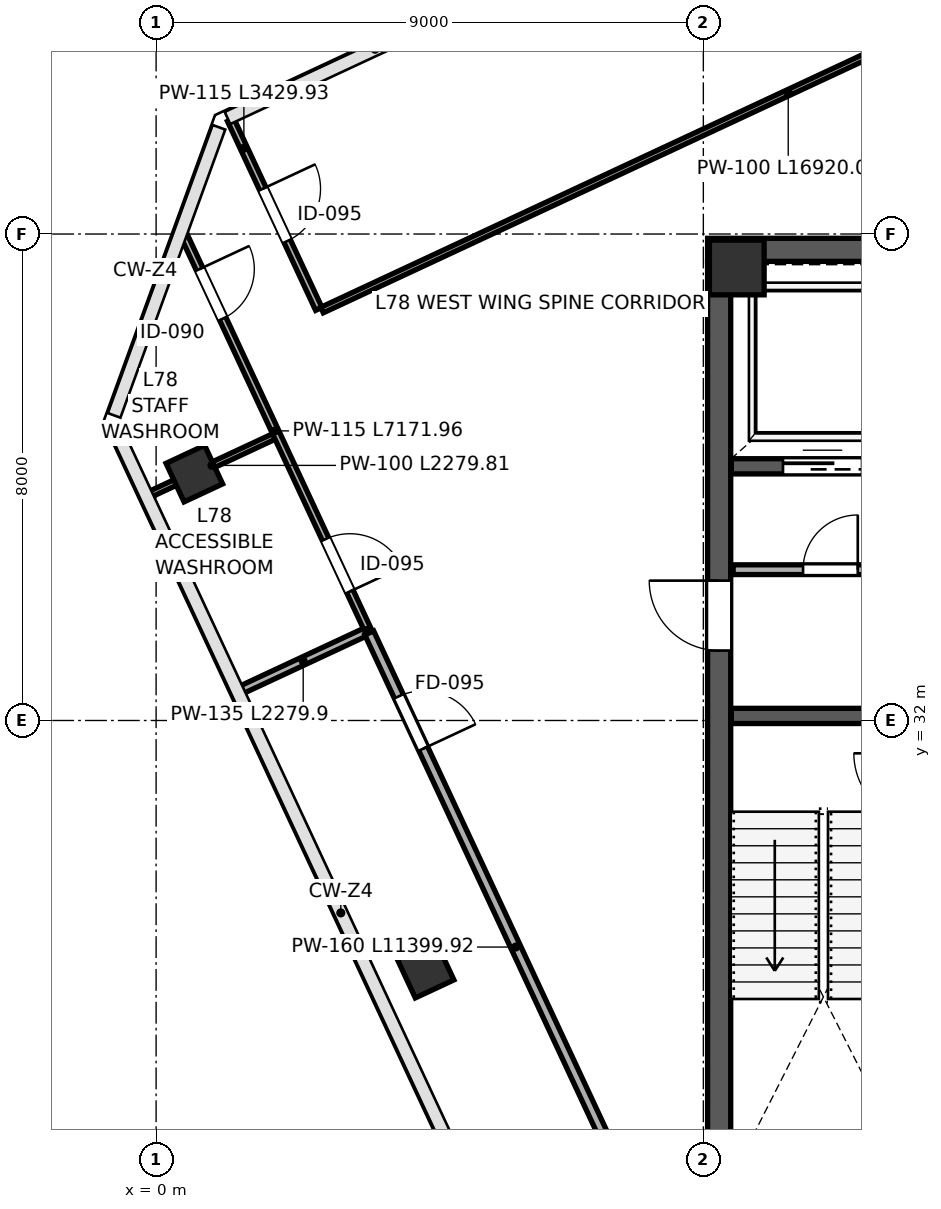
"""IFC4 building model, lengths in metres.
Left out: names, types, materials, properties, quantities, classifications, styles, units other than length and angle.
Written with IfcOpenShell. Run it as: python <this file> out.ifc"""

import sys

from ifc_helpers import new_model, si_unit, direction, frame, frame_2d, origin, origin_2d, place, context, subcontext, project, spatial, rectangle, extrude, clip, halfspace, source, transform, mapped, element, fill, save


model = new_model("IFC4")
c1 = context("Model", 3, precision=1e-05, world=origin(), true_north=direction((0.0, 1.0)))
c2 = subcontext(c1, "Body", "Model", "MODEL_VIEW")
j1 = project(units=[si_unit("LENGTHUNIT", "METRE"), si_unit("PLANEANGLEUNIT", "RADIAN")], contexts=[c1])
p1 = place(None, origin())
s1 = spatial("IfcSite", under=j1, at=p1, CompositionType="ELEMENT")
p2 = place(p1, origin())
s2 = spatial("IfcBuilding", under=s1, at=p2, CompositionType="ELEMENT")
p3 = place(p2, frame((0.0, 0.0, 345.0)))
s3 = spatial("IfcBuildingStorey", under=s2, at=p3, CompositionType="ELEMENT", Elevation=345.0)
m1 = source(origin(), c2, "Body", "SweptSolid", [
    extrude(rectangle(XDim=0.9, YDim=0.9, at=origin_2d()), origin(), (0.0, 0.0, 1.0), 4.198),
])
p4 = place(p3, frame((9.55, 39.45, 0.001), z_axis=(0.0, 0.0, 1.0), x_axis=(1.0, 0.0, 0.0)))
e1 = element("IfcColumn", 1, at=p4, inside=s3, PredefinedType="COLUMN", context=c2, shape_type="MappedRepresentation", body=[
    mapped(m1, transform((0.0, 0.0, 0.0), scale=1.0)),
])
p5 = place(p3, frame((0.629, 36.06, 0.0), z_axis=(0.045749750222, 0.210755362995, 0.976467683707), x_axis=(0.225264718998, -0.954490477645, 0.195457756204)))
e2 = element("IfcColumn", 2, at=p5, inside=s3, PredefinedType="COLUMN", context=c2, shape_type="Clipping", body=[
    clip(clip(extrude(rectangle(XDim=0.7, YDim=0.7, at=origin_2d()), origin(), (0.0, 0.0, 1.0), 4.301), halfspace(frame((0.0, 0.0, 0.104), z_axis=(0.0, 0.0, -1.0), x_axis=(1.0, 0.0, 0.0)), False)), halfspace(frame((0.0, 0.0, 4.198), z_axis=(0.0, 0.0, 1.0), x_axis=(1.0, 0.0, 0.0)), False)),
])
p6 = place(p3, frame((4.432, 27.903, 0.0), z_axis=(-0.038029213994, 0.175277505101, 0.983784313297), x_axis=(0.602059625053, -0.781729661039, 0.162551360911)))
e3 = element("IfcColumn", 3, at=p6, inside=s3, PredefinedType="COLUMN", context=c2, shape_type="Clipping", body=[
    clip(clip(extrude(rectangle(XDim=0.7, YDim=0.7, at=origin_2d()), origin(), (0.0, 0.0, 1.0), 4.269), halfspace(frame((0.0, 0.0, 0.085), z_axis=(0.0, 0.0, -1.0), x_axis=(1.0, 0.0, 0.0)), False)), halfspace(frame((0.0, 0.0, 4.184), z_axis=(0.0, 0.0, 1.0), x_axis=(1.0, 0.0, 0.0)), False)),
])
p7 = place(p3, frame((9.26, 24.45, 0.0), z_axis=(0.0, 0.0, 1.0), x_axis=(0.0, 1.0, 0.0)))
e4 = element("IfcWall", 4, at=p7, inside=s3, PredefinedType="SHEAR", context=c2, shape_type="SweptSolid", body=[
    extrude(rectangle(XDim=15.1, YDim=0.38, at=frame_2d((7.55, 0.0))), origin(), (0.0, 0.0, 1.0), 3.92),
])
p8 = place(p7, frame((8.7, 0.0, 0.0)))
e5 = element("IfcOpeningElement", 5, at=p8, cuts=e4, PredefinedType="OPENING", context=c2, shape_type="SweptSolid", body=[
    extrude(rectangle(XDim=1.15, YDim=2.2, at=frame_2d((0.575, 1.1))), frame((0.0, 0.2, 0.0), z_axis=(0.0, -1.0, 0.0), x_axis=(1.0, 0.0, 0.0)), (0.0, 0.0, 1.0), 0.4),
])
p9 = place(p3, frame((9.07, 39.74, 0.0), z_axis=(0.0, 0.0, 1.0), x_axis=(1.0, 0.0, 0.0)))
e6 = element("IfcWall", 6, at=p9, inside=s3, PredefinedType="SHEAR", context=c2, shape_type="SweptSolid", body=[
    extrude(rectangle(XDim=17.86, YDim=0.38, at=frame_2d((8.93, 0.0))), origin(), (0.0, 0.0, 1.0), 3.92),
])
p10 = place(p3, frame((9.46, 32.075, 0.0), z_axis=(0.0, 0.0, 1.0), x_axis=(1.0, 0.0, 0.0)))
e7 = element("IfcWall", 7, at=p10, inside=s3, PredefinedType="SHEAR", context=c2, shape_type="SweptSolid", body=[
    extrude(rectangle(XDim=3.29, YDim=0.25, at=frame_2d((1.645, 0.0))), origin(), (0.0, 0.0, 1.0), 3.92),
])
p11 = place(p3, frame((9.46, 36.18, 0.0), z_axis=(0.0, 0.0, 1.0), x_axis=(1.0, 0.0, 0.0)))
e8 = element("IfcWall", 8, at=p11, inside=s3, PredefinedType="SHEAR", context=c2, shape_type="SweptSolid", body=[
    extrude(rectangle(XDim=3.79, YDim=0.25, at=frame_2d((1.895, 0.0))), origin(), (0.0, 0.0, 1.0), 3.92),
])
p12 = place(p11, frame((2.62, 0.0, 0.0)))
e9 = element("IfcOpeningElement", 9, at=p12, cuts=e8, PredefinedType="OPENING", context=c2, shape_type="SweptSolid", body=[
    extrude(rectangle(XDim=0.85, YDim=2.1, at=frame_2d((0.425, 1.05))), frame((0.0, 0.135, 0.0), z_axis=(0.0, -1.0, 0.0), x_axis=(1.0, 0.0, 0.0)), (0.0, 0.0, 1.0), 0.27),
])
p13 = place(p11, frame((0.85, 0.0, 0.0)))
e10 = element("IfcOpeningElement", 10, at=p13, cuts=e8, PredefinedType="OPENING", context=c2, shape_type="SweptSolid", body=[
    extrude(rectangle(XDim=1.3, YDim=2.25, at=frame_2d((0.65, 1.125))), frame((0.0, 0.135, 0.0), z_axis=(0.0, -1.0, 0.0), x_axis=(1.0, 0.0, 0.0)), (0.0, 0.0, 1.0), 0.27),
])
p14 = place(p3, frame((9.49, 34.48, 0.0), z_axis=(0.0, 0.0, 1.0), x_axis=(1.0, 0.0, 0.0)))
e11 = element("IfcWall", 11, at=p14, inside=s3, PredefinedType="PARTITIONING", context=c2, shape_type="SweptSolid", body=[
    extrude(rectangle(XDim=3.7, YDim=0.16, at=frame_2d((1.85, 0.0))), origin(), (0.0, 0.0, 1.0), 3.92),
])
p15 = place(p14, frame((1.15, 0.0, 0.0)))
e12 = element("IfcOpeningElement", 12, at=p15, cuts=e11, PredefinedType="OPENING", context=c2, shape_type="SweptSolid", body=[
    extrude(rectangle(XDim=0.9, YDim=2.15, at=frame_2d((0.45, 1.075))), frame((0.0, 0.09, 0.0), z_axis=(0.0, -1.0, 0.0), x_axis=(1.0, 0.0, 0.0)), (0.0, 0.0, 1.0), 0.18),
])
p16 = place(p3, frame((-0.114, 35.713, 0.0), z_axis=(0.0, 0.0, 1.0), x_axis=(0.906322623411, 0.422586443575, 0.0)))
e13 = element("IfcWall", 13, at=p16, inside=s3, PredefinedType="PARTITIONING", context=c2, shape_type="SweptSolid", body=[
    extrude(rectangle(XDim=2.28, YDim=0.1, at=frame_2d((1.14, 0.0))), origin(), (0.0, 0.0, 1.0), 3.255),
])
p17 = place(p3, frame((1.386, 32.496, 0.0), z_axis=(0.0, 0.0, 1.0), x_axis=(0.906281604662, 0.422674405483, 0.0)))
e14 = element("IfcWall", 14, at=p17, inside=s3, PredefinedType="PARTITIONING", context=c2, shape_type="SweptSolid", body=[
    extrude(rectangle(XDim=2.28, YDim=0.135, at=frame_2d((1.14, 0.0))), origin(), (0.0, 0.0, 1.0), 3.255),
])
p18 = place(p3, frame((0.441, 40.013, 0.0), z_axis=(0.0, 0.0, 1.0), x_axis=(0.422618958231, -0.906307462258, 0.0)))
e15 = element("IfcWall", 15, at=p18, inside=s3, PredefinedType="PARTITIONING", context=c2, shape_type="SweptSolid", body=[
    extrude(rectangle(XDim=7.172, YDim=0.115, at=frame_2d((3.586, 0.0))), origin(), (0.0, 0.0, 1.0), 3.92),
])
p19 = place(p18, frame((0.65, 0.0, 0.0)))
e16 = element("IfcOpeningElement", 16, at=p19, cuts=e15, PredefinedType="OPENING", context=c2, shape_type="SweptSolid", body=[
    extrude(rectangle(XDim=0.9, YDim=2.15, at=frame_2d((0.45, 1.075))), frame((0.0, 0.067, 0.0), z_axis=(0.0, -1.0, 0.0), x_axis=(1.0, 0.0, 0.0)), (0.0, 0.0, 1.0), 0.135),
])
p20 = place(p18, frame((5.55, 0.0, 0.0)))
e17 = element("IfcOpeningElement", 17, at=p20, cuts=e15, PredefinedType="OPENING", context=c2, shape_type="SweptSolid", body=[
    extrude(rectangle(XDim=0.95, YDim=2.15, at=frame_2d((0.475, 1.075))), frame((0.0, 0.067, 0.0), z_axis=(0.0, -1.0, 0.0), x_axis=(1.0, 0.0, 0.0)), (0.0, 0.0, 1.0), 0.135),
])
p21 = place(p3, frame((3.505, 33.44, 0.0), z_axis=(0.0, 0.0, 1.0), x_axis=(0.422624000171, -0.90630511114, 0.0)))
e18 = element("IfcWall", 18, at=p21, inside=s3, PredefinedType="PARTITIONING", context=c2, shape_type="SweptSolid", body=[
    extrude(rectangle(XDim=11.4, YDim=0.16, at=frame_2d((5.7, 0.0))), origin(), (0.0, 0.0, 1.0), 3.92),
])
p22 = place(p21, frame((1.15, 0.0, 0.0)))
e19 = element("IfcOpeningElement", 19, at=p22, cuts=e18, PredefinedType="OPENING", context=c2, shape_type="SweptSolid", body=[
    extrude(rectangle(XDim=0.95, YDim=2.15, at=frame_2d((0.475, 1.075))), frame((0.0, 0.09, 0.0), z_axis=(0.0, -1.0, 0.0), x_axis=(1.0, 0.0, 0.0)), (0.0, 0.0, 1.0), 0.18),
])
p23 = place(p3, frame((1.226, 41.877, 0.0), z_axis=(0.0, 0.0, 1.0), x_axis=(0.422616560059, -0.906308580542, 0.0)))
e20 = element("IfcWall", 20, at=p23, inside=s3, PredefinedType="PARTITIONING", context=c2, shape_type="SweptSolid", body=[
    extrude(rectangle(XDim=3.43, YDim=0.115, at=frame_2d((1.715, 0.0))), origin(), (0.0, 0.0, 1.0), 3.92),
])
p24 = place(p23, frame((1.25, 0.0, 0.0)))
e21 = element("IfcOpeningElement", 21, at=p24, cuts=e20, PredefinedType="OPENING", context=c2, shape_type="SweptSolid", body=[
    extrude(rectangle(XDim=0.95, YDim=2.15, at=frame_2d((0.475, 1.075))), frame((0.0, 0.067, 0.0), z_axis=(0.0, -1.0, 0.0), x_axis=(1.0, 0.0, 0.0)), (0.0, 0.0, 1.0), 0.135),
])
p25 = place(p3, frame((2.729, 38.749, 0.0), z_axis=(0.0, 0.0, 1.0), x_axis=(0.906303643754, 0.422627146926, 0.0)))
e22 = element("IfcWall", 22, at=p25, inside=s3, PredefinedType="PARTITIONING", context=c2, shape_type="SweptSolid", body=[
    extrude(rectangle(XDim=16.92, YDim=0.1, at=frame_2d((8.46, 0.0))), origin(), (0.0, 0.0, 1.0), 3.212),
])
m2 = source(origin(), c2, "Body", "SweptSolid", [
    extrude(rectangle(XDim=1.15, YDim=2.2, at=frame_2d((0.575, 1.1))), frame((0.0, 0.025, 0.0), z_axis=(0.0, -1.0, 0.0), x_axis=(1.0, 0.0, 0.0)), (0.0, 0.0, 1.0), 0.05),
])
p26 = place(p8, origin())
e23 = element("IfcDoor", 23, at=p26, inside=s3, OperationType="SINGLE_SWING_RIGHT", PredefinedType="DOOR", context=c2, shape_type="MappedRepresentation", body=[
    mapped(m2, transform((0.0, 0.0, 0.0), scale=1.0)),
])
fill(e5, e23)
m3 = source(origin(), c2, "Body", "SweptSolid", [
    extrude(rectangle(XDim=1.3, YDim=2.25, at=frame_2d((0.65, 1.125))), frame((0.0, 0.025, 0.0), z_axis=(0.0, -1.0, 0.0), x_axis=(1.0, 0.0, 0.0)), (0.0, 0.0, 1.0), 0.05),
])
p27 = place(p13, origin())
e24 = element("IfcDoor", 24, at=p27, inside=s3, OperationType="SLIDING_TO_LEFT", PredefinedType="DOOR", context=c2, shape_type="MappedRepresentation", body=[
    mapped(m3, transform((0.0, 0.0, 0.0), scale=1.0)),
])
fill(e10, e24)
m4 = source(origin(), c2, "Body", "SweptSolid", [
    extrude(rectangle(XDim=0.9, YDim=2.15, at=frame_2d((0.45, 1.075))), frame((0.0, 0.025, 0.0), z_axis=(0.0, -1.0, 0.0), x_axis=(1.0, 0.0, 0.0)), (0.0, 0.0, 1.0), 0.05),
])
p28 = place(p15, origin())
e25 = element("IfcDoor", 25, at=p28, inside=s3, OperationType="SINGLE_SWING_RIGHT", PredefinedType="DOOR", context=c2, shape_type="MappedRepresentation", body=[
    mapped(m4, transform((0.0, 0.0, 0.0), scale=1.0)),
])
fill(e12, e25)
m5 = source(origin(), c2, "Body", "SweptSolid", [
    extrude(rectangle(XDim=0.9, YDim=2.15, at=frame_2d((0.45, 1.075))), frame((0.0, 0.025, 0.0), z_axis=(0.0, -1.0, 0.0), x_axis=(1.0, 0.0, 0.0)), (0.0, 0.0, 1.0), 0.05),
])
p29 = place(p19, origin())
e26 = element("IfcDoor", 26, at=p29, inside=s3, OperationType="SINGLE_SWING_LEFT", PredefinedType="DOOR", context=c2, shape_type="MappedRepresentation", body=[
    mapped(m5, transform((0.0, 0.0, 0.0), scale=1.0)),
])
fill(e16, e26)
m6 = source(origin(), c2, "Body", "SweptSolid", [
    extrude(rectangle(XDim=0.95, YDim=2.15, at=frame_2d((0.475, 1.075))), frame((0.0, 0.025, 0.0), z_axis=(0.0, -1.0, 0.0), x_axis=(1.0, 0.0, 0.0)), (0.0, 0.0, 1.0), 0.05),
])
p30 = place(p20, origin())
e27 = element("IfcDoor", 27, at=p30, inside=s3, OperationType="SINGLE_SWING_RIGHT", PredefinedType="DOOR", context=c2, shape_type="MappedRepresentation", body=[
    mapped(m6, transform((0.0, 0.0, 0.0), scale=1.0)),
])
fill(e17, e27)
m7 = source(origin(), c2, "Body", "SweptSolid", [
    extrude(rectangle(XDim=0.95, YDim=2.15, at=frame_2d((0.475, 1.075))), frame((0.0, 0.025, 0.0), z_axis=(0.0, -1.0, 0.0), x_axis=(1.0, 0.0, 0.0)), (0.0, 0.0, 1.0), 0.05),
])
p31 = place(p22, origin())
e28 = element("IfcDoor", 28, at=p31, inside=s3, OperationType="SINGLE_SWING_RIGHT", PredefinedType="DOOR", context=c2, shape_type="MappedRepresentation", body=[
    mapped(m7, transform((0.0, 0.0, 0.0), scale=1.0)),
])
fill(e19, e28)
p32 = place(p24, origin())
e29 = element("IfcDoor", 29, at=p32, inside=s3, OperationType="SINGLE_SWING_LEFT", PredefinedType="DOOR", context=c2, shape_type="MappedRepresentation", body=[
    mapped(m6, transform((0.0, 0.0, 0.0), scale=1.0)),
])
fill(e21, e29)
save(model, sys.argv[1])
